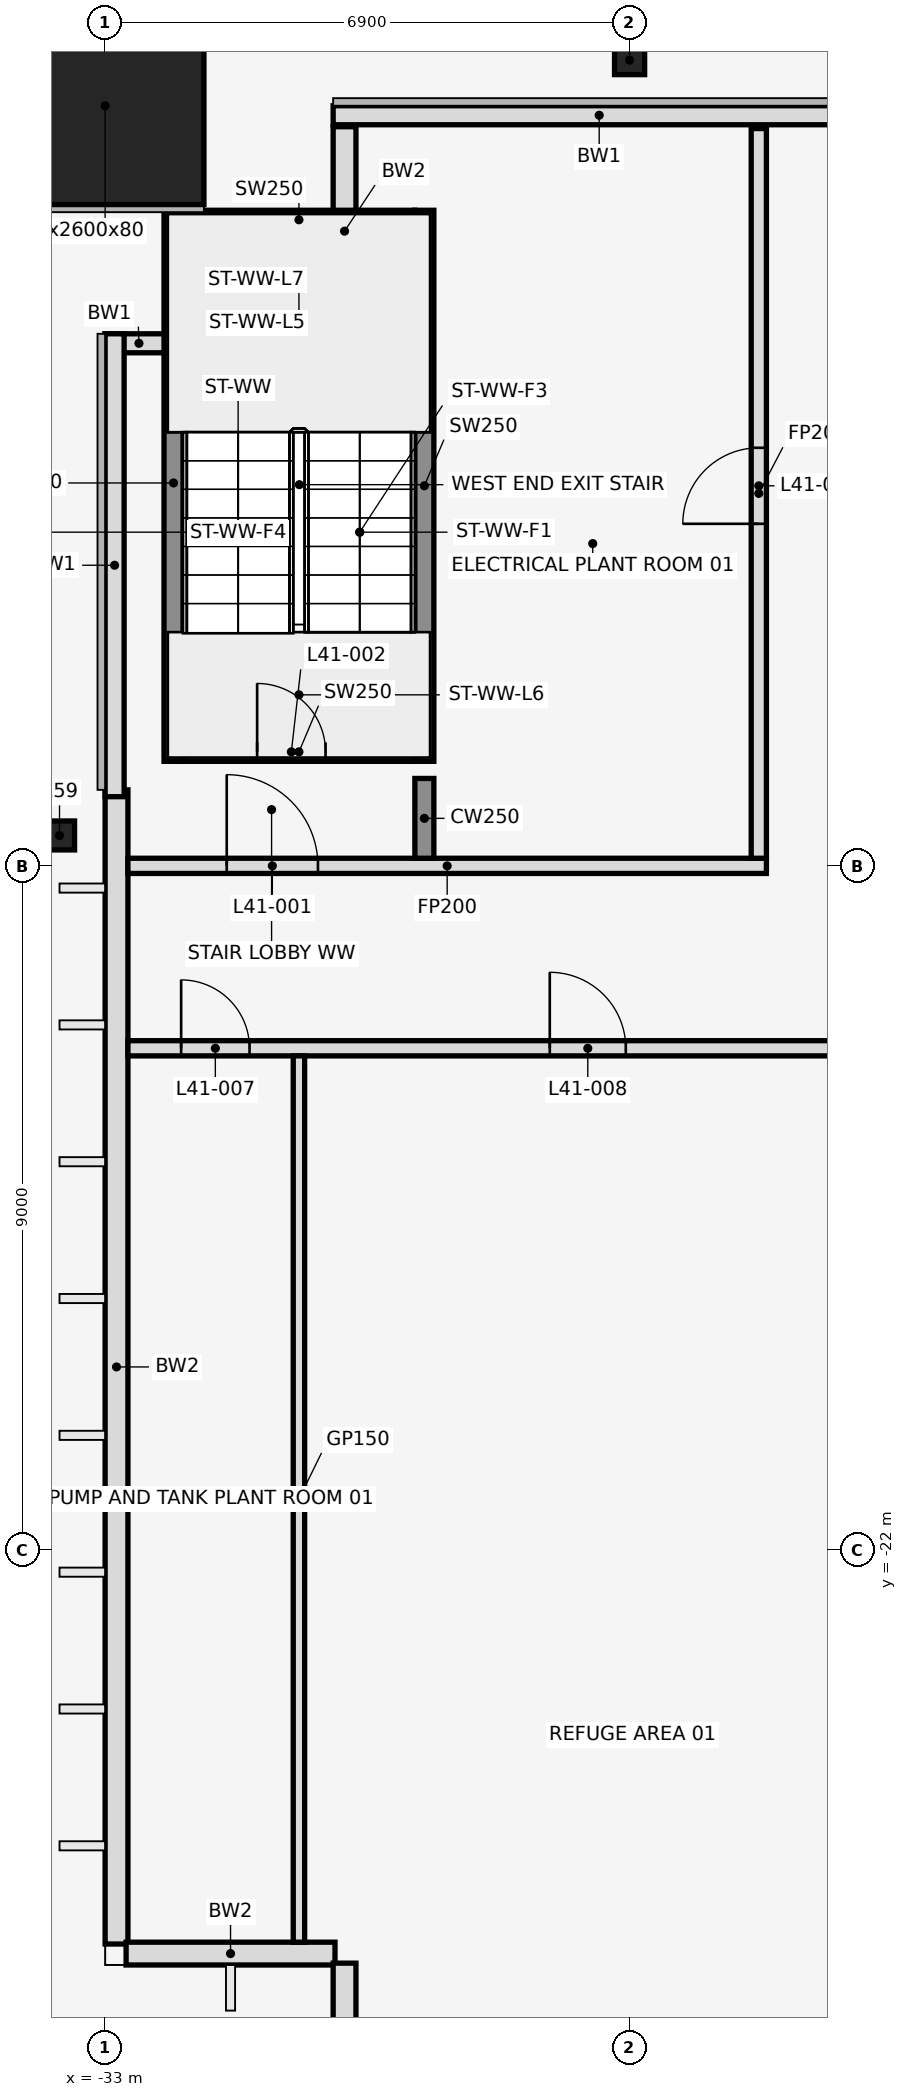
"""IFC4 building model, lengths in metres.
Left out: names, types, materials, properties, quantities, classifications, styles, units other than length and angle.
Written with IfcOpenShell. Run it as: python <this file> out.ifc"""

import sys

from ifc_helpers import new_model, si_unit, direction, frame, frame_2d, origin, origin_2d, place, context, subcontext, project, spatial, rectangle, hollow_rectangle, i_section, extrude, element, fill, save


model = new_model("IFC4")
c1 = context("Model", 3, precision=1e-05, world=origin(), true_north=direction((0.0, 1.0)))
c2 = subcontext(c1, "Body", "Model", "MODEL_VIEW")
j1 = project(units=[si_unit("LENGTHUNIT", "METRE"), si_unit("PLANEANGLEUNIT", "RADIAN")], contexts=[c1])
p1 = place(None, origin())
s1 = spatial("IfcSite", under=j1, at=p1, CompositionType="ELEMENT")
p2 = place(p1, origin())
s2 = spatial("IfcBuilding", under=s1, at=p2, CompositionType="ELEMENT")
p3 = place(p2, frame((0.0, 0.0, 185.5)))
s3 = spatial("IfcBuildingStorey", under=s2, at=p3, CompositionType="ELEMENT", Elevation=185.5)
p4 = place(p3, frame((-33.0, -3.0, 0.0), z_axis=(0.0, 0.0, 1.0), x_axis=(1.0, 0.0, 0.0)))
e1 = element("IfcColumn", 1, at=p4, inside=s3, PredefinedType="COLUMN", context=c2, shape_type="SweptSolid", body=[
    extrude(hollow_rectangle(XDim=2.6, YDim=2.6, WallThickness=0.08, at=origin_2d()), origin(), (0.0, 0.0, 1.0), 5.4),
])
for number, where, z_axis, x_axis in (
    (2, (-26.1, -2.4, 0.0), (0.0, 0.0, 1.0), (1.0, 0.0, 0.0)),
    (3, (-33.6, -12.6, 0.0), (0.0, 0.0, 1.0), (1.0, 0.0, 0.0)),
):
    element("IfcColumn", number, at=place(p3, frame(where, z_axis=z_axis, x_axis=x_axis)), inside=s3, PredefinedType="COLUMN", context=c2, shape_type="SweptSolid", body=[
        extrude(i_section(OverallWidth=0.396, OverallDepth=0.381, WebThickness=0.019, FlangeThickness=0.03, at=origin_2d()), origin(), (0.0, 0.0, 1.0), 5.4),
    ])
p5 = place(p3, frame((-29.85, -3.276, 0.0), z_axis=(0.0, 0.0, 1.0), x_axis=(0.0, -1.0, 0.0)))
e4 = element("IfcWall", 4, at=p5, inside=s3, PredefinedType="STANDARD", context=c2, shape_type="SweptSolid", body=[
    extrude(rectangle(XDim=2.748, YDim=0.3, at=frame_2d((1.374, 0.0))), origin(), (0.0, 0.0, 1.0), 5.25),
])
p6 = place(p3, frame((-32.85, -12.0, 0.0), z_axis=(0.0, 0.0, 1.0), x_axis=(0.0, -1.0, 0.0)))
e5 = element("IfcWall", 5, at=p6, inside=s3, PredefinedType="STANDARD", context=c2, shape_type="SweptSolid", body=[
    extrude(rectangle(XDim=15.184, YDim=0.3, at=frame_2d((7.592, 0.0))), origin(), (0.0, 0.0, 1.0), 4.338),
])
for number, where, z_axis, x_axis in (
    (6, (-32.724, -27.31, 0.0), (0.0, 0.0, 1.0), (1.0, 0.0, 0.0)),
    (7, (-29.85, -27.436, 0.0), (0.0, 0.0, 1.0), (0.0, -1.0, 0.0)),
):
    element("IfcWall", number, at=place(p3, frame(where, z_axis=z_axis, x_axis=x_axis)), inside=s3, PredefinedType="STANDARD", context=c2, shape_type="SweptSolid", body=[
        extrude(rectangle(XDim=2.748, YDim=0.3, at=frame_2d((1.374, 0.0))), origin(), (0.0, 0.0, 1.0), 4.414),
    ])
p7 = place(p3, frame((-23.0, -3.125, 0.0), z_axis=(0.0, 0.0, 1.0), x_axis=(-1.0, 0.0, 0.0)))
e8 = element("IfcWall", 8, at=p7, inside=s3, PredefinedType="STANDARD", context=c2, shape_type="SweptSolid", body=[
    extrude(rectangle(XDim=7.0, YDim=0.25, at=frame_2d((3.5, 0.0))), origin(), (0.0, 0.0, 1.0), 5.25),
])
p8 = place(p3, frame((-32.11, -6.125, 0.0), z_axis=(0.0, 0.0, 1.0), x_axis=(-1.0, 0.0, 0.0)))
e9 = element("IfcWall", 9, at=p8, inside=s3, PredefinedType="STANDARD", context=c2, shape_type="SweptSolid", body=[
    extrude(rectangle(XDim=0.89, YDim=0.25, at=frame_2d((0.445, 0.0))), origin(), (0.0, 0.0, 1.0), 5.25),
])
p9 = place(p3, frame((-32.875, -6.0, 0.0), z_axis=(0.0, 0.0, 1.0), x_axis=(0.0, -1.0, 0.0)))
e10 = element("IfcWall", 10, at=p9, inside=s3, PredefinedType="STANDARD", context=c2, shape_type="SweptSolid", body=[
    extrude(rectangle(XDim=6.09, YDim=0.25, at=frame_2d((3.045, 0.0))), origin(), (0.0, 0.0, 1.0), 5.25),
])
p10 = place(p3, frame((-32.1, -11.625, 0.0), z_axis=(0.0, 0.0, 1.0), x_axis=(0.0, 1.0, 0.0)))
e11 = element("IfcWall", 11, at=p10, inside=s3, PredefinedType="SHEAR", context=c2, shape_type="SweptSolid", body=[
    extrude(rectangle(XDim=7.325, YDim=0.25, at=frame_2d((3.663, 0.0))), origin(), (0.0, 0.0, 1.0), 5.4),
])
p11 = place(p3, frame((-28.8, -11.625, 0.0), z_axis=(0.0, 0.0, 1.0), x_axis=(0.0, 1.0, 0.0)))
e12 = element("IfcWall", 12, at=p11, inside=s3, PredefinedType="SHEAR", context=c2, shape_type="SweptSolid", body=[
    extrude(rectangle(XDim=7.25, YDim=0.25, at=frame_2d((3.625, 0.0))), origin(), (0.0, 0.0, 1.0), 5.4),
])
p12 = place(p3, frame((-31.975, -11.5, 0.0), z_axis=(0.0, 0.0, 1.0), x_axis=(1.0, 0.0, 0.0)))
e13 = element("IfcWall", 13, at=p12, inside=s3, PredefinedType="SHEAR", context=c2, shape_type="SweptSolid", body=[
    extrude(rectangle(XDim=3.05, YDim=0.25, at=frame_2d((1.525, 0.0))), origin(), (0.0, 0.0, 1.0), 5.4),
])
p13 = place(p12, frame((0.975, 0.0, 0.0)))
e14 = element("IfcOpeningElement", 14, at=p13, cuts=e13, PredefinedType="OPENING", context=c2, shape_type="SweptSolid", body=[
    extrude(rectangle(XDim=0.9, YDim=2.1, at=frame_2d((0.45, 1.05))), frame((0.0, 0.137, 0.0), z_axis=(0.0, -1.0, 0.0), x_axis=(1.0, 0.0, 0.0)), (0.0, 0.0, 1.0), 0.274),
])
p14 = place(p3, frame((-31.975, -4.5, 0.0), z_axis=(0.0, 0.0, 1.0), x_axis=(1.0, 0.0, 0.0)))
e15 = element("IfcWall", 15, at=p14, inside=s3, PredefinedType="SHEAR", context=c2, shape_type="SweptSolid", body=[
    extrude(rectangle(XDim=3.05, YDim=0.25, at=frame_2d((1.525, 0.0))), origin(), (0.0, 0.0, 1.0), 5.4),
])
p15 = place(p3, frame((-32.7, -15.4, 0.0), z_axis=(0.0, 0.0, 1.0), x_axis=(1.0, 0.0, 0.0)))
e16 = element("IfcWall", 16, at=p15, inside=s3, PredefinedType="PARTITIONING", context=c2, shape_type="SweptSolid", body=[
    extrude(rectangle(XDim=65.4, YDim=0.2, at=frame_2d((32.7, 0.0))), origin(), (0.0, 0.0, 1.0), 4.26),
])
p16 = place(p15, frame((0.7, 0.0, 0.0)))
e17 = element("IfcOpeningElement", 17, at=p16, cuts=e16, PredefinedType="OPENING", context=c2, shape_type="SweptSolid", body=[
    extrude(rectangle(XDim=0.9, YDim=2.1, at=frame_2d((0.45, 1.05))), frame((0.0, 0.112, 0.0), z_axis=(0.0, -1.0, 0.0), x_axis=(1.0, 0.0, 0.0)), (0.0, 0.0, 1.0), 0.224),
])
p17 = place(p15, frame((5.55, 0.0, 0.0)))
e18 = element("IfcOpeningElement", 18, at=p17, cuts=e16, PredefinedType="OPENING", context=c2, shape_type="SweptSolid", body=[
    extrude(rectangle(XDim=1.0, YDim=2.1, at=frame_2d((0.5, 1.05))), frame((0.0, 0.112, 0.0), z_axis=(0.0, -1.0, 0.0), x_axis=(1.0, 0.0, 0.0)), (0.0, 0.0, 1.0), 0.224),
])
p18 = place(p15, frame((14.85, 0.0, 0.0)))
e19 = element("IfcOpeningElement", 19, at=p18, cuts=e16, PredefinedType="OPENING", context=c2, shape_type="SweptSolid", body=[
    extrude(rectangle(XDim=0.9, YDim=2.1, at=frame_2d((0.45, 1.05))), frame((0.0, 0.112, 0.0), z_axis=(0.0, -1.0, 0.0), x_axis=(1.0, 0.0, 0.0)), (0.0, 0.0, 1.0), 0.224),
])
p19 = place(p15, frame((23.55, 0.0, 0.0)))
e20 = element("IfcOpeningElement", 20, at=p19, cuts=e16, PredefinedType="OPENING", context=c2, shape_type="SweptSolid", body=[
    extrude(rectangle(XDim=1.0, YDim=2.1, at=frame_2d((0.5, 1.05))), frame((0.0, 0.112, 0.0), z_axis=(0.0, -1.0, 0.0), x_axis=(1.0, 0.0, 0.0)), (0.0, 0.0, 1.0), 0.224),
])
p20 = place(p15, frame((32.15, 0.0, 0.0)))
e21 = element("IfcOpeningElement", 21, at=p20, cuts=e16, PredefinedType="OPENING", context=c2, shape_type="SweptSolid", body=[
    extrude(rectangle(XDim=1.0, YDim=2.1, at=frame_2d((0.5, 1.05))), frame((0.0, 0.112, 0.0), z_axis=(0.0, -1.0, 0.0), x_axis=(1.0, 0.0, 0.0)), (0.0, 0.0, 1.0), 0.224),
])
p21 = place(p15, frame((40.95, 0.0, 0.0)))
e22 = element("IfcOpeningElement", 22, at=p21, cuts=e16, PredefinedType="OPENING", context=c2, shape_type="SweptSolid", body=[
    extrude(rectangle(XDim=1.0, YDim=2.1, at=frame_2d((0.5, 1.05))), frame((0.0, 0.112, 0.0), z_axis=(0.0, -1.0, 0.0), x_axis=(1.0, 0.0, 0.0)), (0.0, 0.0, 1.0), 0.224),
])
p22 = place(p15, frame((49.55, 0.0, 0.0)))
e23 = element("IfcOpeningElement", 23, at=p22, cuts=e16, PredefinedType="OPENING", context=c2, shape_type="SweptSolid", body=[
    extrude(rectangle(XDim=1.0, YDim=2.1, at=frame_2d((0.5, 1.05))), frame((0.0, 0.112, 0.0), z_axis=(0.0, -1.0, 0.0), x_axis=(1.0, 0.0, 0.0)), (0.0, 0.0, 1.0), 0.224),
])
p23 = place(p15, frame((58.85, 0.0, 0.0)))
e24 = element("IfcOpeningElement", 24, at=p23, cuts=e16, PredefinedType="OPENING", context=c2, shape_type="SweptSolid", body=[
    extrude(rectangle(XDim=1.0, YDim=2.1, at=frame_2d((0.5, 1.05))), frame((0.0, 0.112, 0.0), z_axis=(0.0, -1.0, 0.0), x_axis=(1.0, 0.0, 0.0)), (0.0, 0.0, 1.0), 0.224),
])
p24 = place(p15, frame((63.85, 0.0, 0.0)))
e25 = element("IfcOpeningElement", 25, at=p24, cuts=e16, PredefinedType="OPENING", context=c2, shape_type="SweptSolid", body=[
    extrude(rectangle(XDim=0.9, YDim=2.1, at=frame_2d((0.45, 1.05))), frame((0.0, 0.112, 0.0), z_axis=(0.0, -1.0, 0.0), x_axis=(1.0, 0.0, 0.0)), (0.0, 0.0, 1.0), 0.224),
])
p25 = place(p3, frame((-32.7, -13.0, 0.0), z_axis=(0.0, 0.0, 1.0), x_axis=(1.0, 0.0, 0.0)))
e26 = element("IfcWall", 26, at=p25, inside=s3, PredefinedType="PARTITIONING", context=c2, shape_type="SweptSolid", body=[
    extrude(rectangle(XDim=8.4, YDim=0.2, at=frame_2d((4.2, 0.0))), origin(), (0.0, 0.0, 1.0), 4.26),
])
p26 = place(p25, frame((1.3, 0.0, 0.0)))
e27 = element("IfcOpeningElement", 27, at=p26, cuts=e26, PredefinedType="OPENING", context=c2, shape_type="SweptSolid", body=[
    extrude(rectangle(XDim=1.2, YDim=2.1, at=frame_2d((0.6, 1.05))), frame((0.0, 0.112, 0.0), z_axis=(0.0, -1.0, 0.0), x_axis=(1.0, 0.0, 0.0)), (0.0, 0.0, 1.0), 0.224),
])
p27 = place(p3, frame((-30.45, -27.16, 0.0), z_axis=(0.0, 0.0, 1.0), x_axis=(0.0, 1.0, 0.0)))
e28 = element("IfcWall", 28, at=p27, inside=s3, PredefinedType="PARTITIONING", context=c2, shape_type="SweptSolid", body=[
    extrude(rectangle(XDim=11.66, YDim=0.15, at=frame_2d((5.83, 0.0))), origin(), (0.0, 0.0, 1.0), 4.26),
])
p28 = place(p3, frame((-28.8, -12.9, 0.0), z_axis=(0.0, 0.0, 1.0), x_axis=(0.0, 1.0, 0.0)))
e29 = element("IfcWall", 29, at=p28, inside=s3, PredefinedType="SHEAR", context=c2, shape_type="SweptSolid", body=[
    extrude(rectangle(XDim=1.05, YDim=0.25, at=frame_2d((0.525, 0.0))), origin(), (0.0, 0.0, 1.0), 5.4),
])
p29 = place(p3, frame((-24.4, -12.9, 0.0), z_axis=(0.0, 0.0, 1.0), x_axis=(0.0, 1.0, 0.0)))
e30 = element("IfcWall", 30, at=p29, inside=s3, PredefinedType="PARTITIONING", context=c2, shape_type="SweptSolid", body=[
    extrude(rectangle(XDim=9.6, YDim=0.2, at=frame_2d((4.8, 0.0))), origin(), (0.0, 0.0, 1.0), 4.26),
])
p30 = place(p29, frame((4.4, 0.0, 0.0)))
e31 = element("IfcOpeningElement", 31, at=p30, cuts=e30, PredefinedType="OPENING", context=c2, shape_type="SweptSolid", body=[
    extrude(rectangle(XDim=1.0, YDim=2.1, at=frame_2d((0.5, 1.05))), frame((0.0, 0.112, 0.0), z_axis=(0.0, -1.0, 0.0), x_axis=(1.0, 0.0, 0.0)), (0.0, 0.0, 1.0), 0.224),
])
p31 = place(p26, origin())
e32 = element("IfcDoor", 32, at=p31, inside=s3, OperationType="SINGLE_SWING_LEFT", PredefinedType="DOOR", context=c2, shape_type="SweptSolid", body=[
    extrude(rectangle(XDim=1.2, YDim=2.1, at=frame_2d((0.6, 1.05))), frame((0.0, 0.025, 0.0), z_axis=(0.0, -1.0, 0.0), x_axis=(1.0, 0.0, 0.0)), (0.0, 0.0, 1.0), 0.05),
])
fill(e27, e32)
p32 = place(p13, origin())
e33 = element("IfcDoor", 33, at=p32, inside=s3, OperationType="SINGLE_SWING_LEFT", PredefinedType="DOOR", context=c2, shape_type="SweptSolid", body=[
    extrude(rectangle(XDim=0.9, YDim=2.1, at=frame_2d((0.45, 1.05))), frame((0.0, 0.025, 0.0), z_axis=(0.0, -1.0, 0.0), x_axis=(1.0, 0.0, 0.0)), (0.0, 0.0, 1.0), 0.05),
])
fill(e14, e33)
p33 = place(p30, origin())
e34 = element("IfcDoor", 34, at=p33, inside=s3, OperationType="SINGLE_SWING_LEFT", PredefinedType="DOOR", context=c2, shape_type="SweptSolid", body=[
    extrude(rectangle(XDim=1.0, YDim=2.1, at=frame_2d((0.5, 1.05))), frame((0.0, 0.025, 0.0), z_axis=(0.0, -1.0, 0.0), x_axis=(1.0, 0.0, 0.0)), (0.0, 0.0, 1.0), 0.05),
])
fill(e31, e34)
p34 = place(p16, frame((0.9, 0.0, 0.0), z_axis=(0.0, 0.0, 1.0), x_axis=(-1.0, 0.0, 0.0)))
e35 = element("IfcDoor", 35, at=p34, inside=s3, OperationType="SINGLE_SWING_LEFT", PredefinedType="DOOR", context=c2, shape_type="SweptSolid", body=[
    extrude(rectangle(XDim=0.9, YDim=2.1, at=frame_2d((0.45, 1.05))), frame((0.0, 0.025, 0.0), z_axis=(0.0, -1.0, 0.0), x_axis=(1.0, 0.0, 0.0)), (0.0, 0.0, 1.0), 0.05),
])
fill(e17, e35)
p35 = place(p17, frame((1.0, 0.0, 0.0), z_axis=(0.0, 0.0, 1.0), x_axis=(-1.0, 0.0, 0.0)))
e36 = element("IfcDoor", 36, at=p35, inside=s3, OperationType="SINGLE_SWING_RIGHT", PredefinedType="DOOR", context=c2, shape_type="SweptSolid", body=[
    extrude(rectangle(XDim=1.0, YDim=2.1, at=frame_2d((0.5, 1.05))), frame((0.0, 0.025, 0.0), z_axis=(0.0, -1.0, 0.0), x_axis=(1.0, 0.0, 0.0)), (0.0, 0.0, 1.0), 0.05),
])
fill(e18, e36)
save(model, sys.argv[1])
